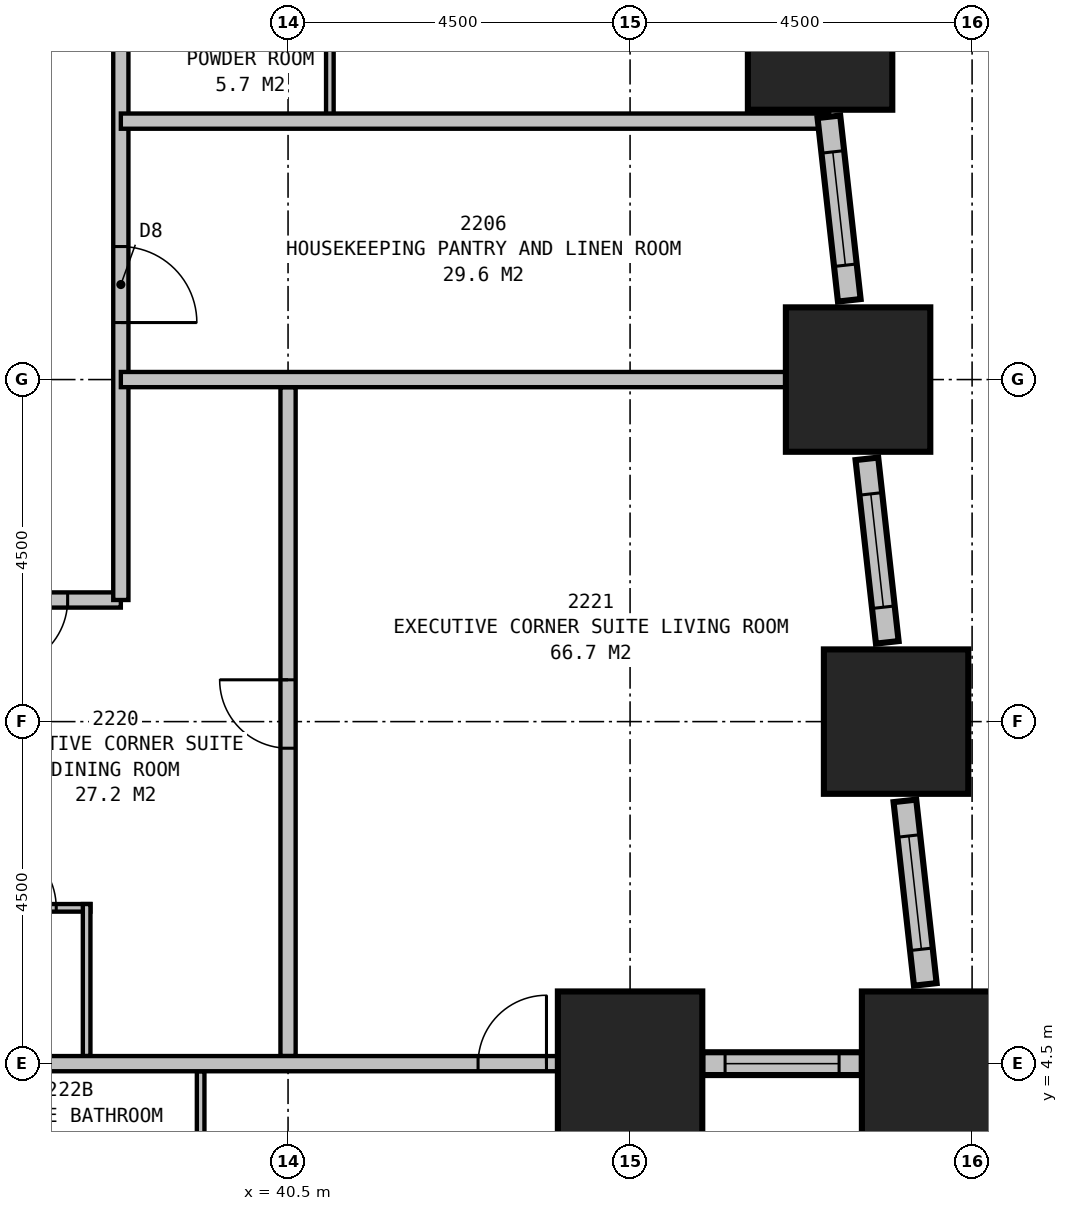
"""IFC4 building model, lengths in metres.
Left out: names, types, materials, properties, quantities, classifications, styles, units other than length and angle.
Written with IfcOpenShell. Run it as: python <this file> out.ifc"""

import sys

from ifc_helpers import new_model, si_unit, direction, frame, frame_2d, origin, origin_2d, place, context, subcontext, project, spatial, rectangle, extrude, element, fill, save


model = new_model("IFC4")
c1 = context("Model", 3, precision=1e-05, world=origin(), true_north=direction((0.0, 1.0)))
c2 = subcontext(c1, "Body", "Model", "MODEL_VIEW")
j1 = project(units=[si_unit("LENGTHUNIT", "METRE"), si_unit("PLANEANGLEUNIT", "RADIAN")], contexts=[c1])
p1 = place(None, origin())
s1 = spatial("IfcSite", under=j1, at=p1, CompositionType="ELEMENT")
p2 = place(p1, origin())
s2 = spatial("IfcBuilding", under=s1, at=p2, CompositionType="ELEMENT")
p3 = place(p2, frame((0.0, 0.0, 89.9)))
s3 = spatial("IfcBuildingStorey", under=s2, at=p3, CompositionType="ELEMENT", Elevation=89.9)
for number, where, z_axis, x_axis in (
    (1, (45.0, 4.5, 0.0), (0.0, 0.0, 1.0), (1.0, 0.0, 0.0)),
    (2, (49.0, 4.5, 0.0), (0.0, 0.0, 1.0), (1.0, 0.0, 0.0)),
    (3, (48.5, 9.0, 0.0), (0.0, 0.0, 1.0), (1.0, 0.0, 0.0)),
    (4, (48.0, 13.5, 0.0), (0.0, 0.0, 1.0), (1.0, 0.0, 0.0)),
    (5, (47.5, 18.0, 0.0), (0.0, 0.0, 1.0), (1.0, 0.0, 0.0)),
):
    element("IfcColumn", number, at=place(p3, frame(where, z_axis=z_axis, x_axis=x_axis)), inside=s3, PredefinedType="COLUMN", context=c2, shape_type="SweptSolid", body=[
        extrude(rectangle(XDim=1.9, YDim=1.9, at=origin_2d()), origin(), (0.0, 0.0, 1.0), 3.5),
    ])
p4 = place(p3, frame((45.95, 4.5, 0.0), z_axis=(0.0, 0.0, 1.0), x_axis=(1.0, 0.0, 0.0)))
e6 = element("IfcWall", 6, at=p4, inside=s3, PredefinedType="STANDARD", context=c2, shape_type="SweptSolid", body=[
    extrude(rectangle(XDim=2.1, YDim=0.3, at=frame_2d((1.05, 0.0))), origin(), (0.0, 0.0, 1.0), 2.15),
])
p5 = place(p4, frame((0.3, 0.0, 0.5)))
e7 = element("IfcOpeningElement", 7, at=p5, cuts=e6, PredefinedType="OPENING", context=c2, shape_type="SweptSolid", body=[
    extrude(rectangle(XDim=1.5, YDim=1.5, at=frame_2d((0.75, 0.75))), frame((0.0, 0.16, 0.0), z_axis=(0.0, -1.0, 0.0), x_axis=(1.0, 0.0, 0.0)), (0.0, 0.0, 1.0), 0.32),
])
p6 = place(p3, frame((48.884, 5.543, 0.0), z_axis=(0.0, 0.0, 1.0), x_axis=(-0.110343286306, 0.993893535127, 0.0)))
e8 = element("IfcWall", 8, at=p6, inside=s3, PredefinedType="STANDARD", context=c2, shape_type="SweptSolid", body=[
    extrude(rectangle(XDim=2.429, YDim=0.3, at=frame_2d((1.215, 0.0))), origin(), (0.0, 0.0, 1.0), 2.15),
])
p7 = place(p6, frame((0.465, 0.0, 0.5)))
e9 = element("IfcOpeningElement", 9, at=p7, cuts=e8, PredefinedType="OPENING", context=c2, shape_type="SweptSolid", body=[
    extrude(rectangle(XDim=1.5, YDim=1.5, at=frame_2d((0.75, 0.75))), frame((0.0, 0.16, 0.0), z_axis=(0.0, -1.0, 0.0), x_axis=(1.0, 0.0, 0.0)), (0.0, 0.0, 1.0), 0.32),
])
p8 = place(p3, frame((48.384, 10.043, 0.0), z_axis=(0.0, 0.0, 1.0), x_axis=(-0.110343286306, 0.993893535127, 0.0)))
e10 = element("IfcWall", 10, at=p8, inside=s3, PredefinedType="STANDARD", context=c2, shape_type="SweptSolid", body=[
    extrude(rectangle(XDim=2.429, YDim=0.3, at=frame_2d((1.215, 0.0))), origin(), (0.0, 0.0, 1.0), 2.15),
])
p9 = place(p8, frame((0.465, 0.0, 0.5)))
e11 = element("IfcOpeningElement", 11, at=p9, cuts=e10, PredefinedType="OPENING", context=c2, shape_type="SweptSolid", body=[
    extrude(rectangle(XDim=1.5, YDim=1.5, at=frame_2d((0.75, 0.75))), frame((0.0, 0.16, 0.0), z_axis=(0.0, -1.0, 0.0), x_axis=(1.0, 0.0, 0.0)), (0.0, 0.0, 1.0), 0.32),
])
p10 = place(p3, frame((47.884, 14.543, 0.0), z_axis=(0.0, 0.0, 1.0), x_axis=(-0.110343286306, 0.993893535127, 0.0)))
e12 = element("IfcWall", 12, at=p10, inside=s3, PredefinedType="STANDARD", context=c2, shape_type="SweptSolid", body=[
    extrude(rectangle(XDim=2.429, YDim=0.3, at=frame_2d((1.215, 0.0))), origin(), (0.0, 0.0, 1.0), 2.15),
])
p11 = place(p10, frame((0.465, 0.0, 0.5)))
e13 = element("IfcOpeningElement", 13, at=p11, cuts=e12, PredefinedType="OPENING", context=c2, shape_type="SweptSolid", body=[
    extrude(rectangle(XDim=1.5, YDim=1.5, at=frame_2d((0.75, 0.75))), frame((0.0, 0.16, 0.0), z_axis=(0.0, -1.0, 0.0), x_axis=(1.0, 0.0, 0.0)), (0.0, 0.0, 1.0), 0.32),
])
p12 = place(p3, frame((11.2, 10.6, 0.0), z_axis=(0.0, 0.0, 1.0), x_axis=(1.0, 0.0, 0.0)))
e14 = element("IfcWall", 14, at=p12, inside=s3, PredefinedType="PARTITIONING", context=c2, shape_type="SweptSolid", body=[
    extrude(rectangle(XDim=27.1, YDim=0.2, at=frame_2d((13.55, 0.0))), origin(), (0.0, 0.0, 1.0), 3.25),
])
p13 = place(p12, frame((5.95, 0.0, 0.0), z_axis=(0.0, 0.0, 1.0), x_axis=(-1.0, 0.0, 0.0)))
e15 = element("IfcOpeningElement", 15, at=p13, cuts=e14, PredefinedType="OPENING", context=c2, shape_type="SweptSolid", body=[
    extrude(rectangle(XDim=0.9, YDim=2.1, at=frame_2d((0.45, 1.05))), frame((0.0, 0.11, 0.0), z_axis=(0.0, -1.0, 0.0), x_axis=(1.0, 0.0, 0.0)), (0.0, 0.0, 1.0), 0.22),
])
p14 = place(p12, frame((13.2, 0.0, 0.0), z_axis=(0.0, 0.0, 1.0), x_axis=(-1.0, 0.0, 0.0)))
e16 = element("IfcOpeningElement", 16, at=p14, cuts=e14, PredefinedType="OPENING", context=c2, shape_type="SweptSolid", body=[
    extrude(rectangle(XDim=1.0, YDim=2.1, at=frame_2d((0.5, 1.05))), frame((0.0, 0.11, 0.0), z_axis=(0.0, -1.0, 0.0), x_axis=(1.0, 0.0, 0.0)), (0.0, 0.0, 1.0), 0.22),
])
p15 = place(p12, frame((20.0, 0.0, 0.0), z_axis=(0.0, 0.0, 1.0), x_axis=(-1.0, 0.0, 0.0)))
e17 = element("IfcOpeningElement", 17, at=p15, cuts=e14, PredefinedType="OPENING", context=c2, shape_type="SweptSolid", body=[
    extrude(rectangle(XDim=0.9, YDim=2.1, at=frame_2d((0.45, 1.05))), frame((0.0, 0.11, 0.0), z_axis=(0.0, -1.0, 0.0), x_axis=(1.0, 0.0, 0.0)), (0.0, 0.0, 1.0), 0.22),
])
p16 = place(p12, frame((1.6, 0.0, 0.0), z_axis=(0.0, 0.0, 1.0), x_axis=(-1.0, 0.0, 0.0)))
e18 = element("IfcOpeningElement", 18, at=p16, cuts=e14, PredefinedType="OPENING", context=c2, shape_type="SweptSolid", body=[
    extrude(rectangle(XDim=0.9, YDim=2.1, at=frame_2d((0.45, 1.05))), frame((0.0, 0.11, 0.0), z_axis=(0.0, -1.0, 0.0), x_axis=(1.0, 0.0, 0.0)), (0.0, 0.0, 1.0), 0.22),
])
p17 = place(p12, frame((26.4, 0.0, 0.0), z_axis=(0.0, 0.0, 1.0), x_axis=(-1.0, 0.0, 0.0)))
e19 = element("IfcOpeningElement", 19, at=p17, cuts=e14, PredefinedType="OPENING", context=c2, shape_type="SweptSolid", body=[
    extrude(rectangle(XDim=0.9, YDim=2.1, at=frame_2d((0.45, 1.05))), frame((0.0, 0.11, 0.0), z_axis=(0.0, -1.0, 0.0), x_axis=(1.0, 0.0, 0.0)), (0.0, 0.0, 1.0), 0.22),
])
p18 = place(p3, frame((38.3, 10.6, 0.0), z_axis=(0.0, 0.0, 1.0), x_axis=(0.0, 1.0, 0.0)))
e20 = element("IfcWall", 20, at=p18, inside=s3, PredefinedType="PARTITIONING", context=c2, shape_type="SweptSolid", body=[
    extrude(rectangle(XDim=19.3, YDim=0.2, at=frame_2d((9.65, 0.0))), origin(), (0.0, 0.0, 1.0), 3.25),
])
p19 = place(p18, frame((4.65, 0.0, 0.0), z_axis=(0.0, 0.0, 1.0), x_axis=(-1.0, 0.0, 0.0)))
e21 = element("IfcOpeningElement", 21, at=p19, cuts=e20, PredefinedType="OPENING", context=c2, shape_type="SweptSolid", body=[
    extrude(rectangle(XDim=1.0, YDim=2.1, at=frame_2d((0.5, 1.05))), frame((0.0, 0.11, 0.0), z_axis=(0.0, -1.0, 0.0), x_axis=(1.0, 0.0, 0.0)), (0.0, 0.0, 1.0), 0.22),
])
p20 = place(p18, frame((9.95, 0.0, 0.0), z_axis=(0.0, 0.0, 1.0), x_axis=(-1.0, 0.0, 0.0)))
e22 = element("IfcOpeningElement", 22, at=p20, cuts=e20, PredefinedType="OPENING", context=c2, shape_type="SweptSolid", body=[
    extrude(rectangle(XDim=0.9, YDim=2.1, at=frame_2d((0.45, 1.05))), frame((0.0, 0.11, 0.0), z_axis=(0.0, -1.0, 0.0), x_axis=(1.0, 0.0, 0.0)), (0.0, 0.0, 1.0), 0.22),
])
p21 = place(p3, frame((38.3, 16.9, 0.0), z_axis=(0.0, 0.0, 1.0), x_axis=(1.0, 0.0, 0.0)))
e23 = element("IfcWall", 23, at=p21, inside=s3, PredefinedType="PARTITIONING", context=c2, shape_type="SweptSolid", body=[
    extrude(rectangle(XDim=9.321, YDim=0.2, at=frame_2d((4.661, 0.0))), origin(), (0.0, 0.0, 1.0), 3.25),
])
p22 = place(p3, frame((41.05, 16.9, 0.0), z_axis=(0.0, 0.0, 1.0), x_axis=(0.0, 1.0, 0.0)))
e24 = element("IfcWall", 24, at=p22, inside=s3, PredefinedType="PLUMBINGWALL", context=c2, shape_type="SweptSolid", body=[
    extrude(rectangle(XDim=2.4, YDim=0.1, at=frame_2d((1.2, 0.0))), origin(), (0.0, 0.0, 1.0), 3.25),
])
p23 = place(p3, frame((38.3, 13.5, 0.0), z_axis=(0.0, 0.0, 1.0), x_axis=(1.0, 0.0, 0.0)))
e25 = element("IfcWall", 25, at=p23, inside=s3, PredefinedType="PARTITIONING", context=c2, shape_type="SweptSolid", body=[
    extrude(rectangle(XDim=9.921, YDim=0.2, at=frame_2d((4.96, 0.0))), origin(), (0.0, 0.0, 1.0), 1.95),
])
p24 = place(p3, frame((35.9, 4.5, 0.0), z_axis=(0.0, 0.0, 1.0), x_axis=(1.0, 0.0, 0.0)))
e26 = element("IfcWall", 26, at=p24, inside=s3, PredefinedType="PARTITIONING", context=c2, shape_type="SweptSolid", body=[
    extrude(rectangle(XDim=9.1, YDim=0.2, at=frame_2d((4.55, 0.0))), origin(), (0.0, 0.0, 1.0), 3.25),
])
p25 = place(p24, frame((7.1, 0.0, 0.0)))
e27 = element("IfcOpeningElement", 27, at=p25, cuts=e26, PredefinedType="OPENING", context=c2, shape_type="SweptSolid", body=[
    extrude(rectangle(XDim=0.9, YDim=2.1, at=frame_2d((0.45, 1.05))), frame((0.0, 0.11, 0.0), z_axis=(0.0, -1.0, 0.0), x_axis=(1.0, 0.0, 0.0)), (0.0, 0.0, 1.0), 0.22),
])
p26 = place(p3, frame((40.5, 4.6, 0.0), z_axis=(0.0, 0.0, 1.0), x_axis=(0.0, 1.0, 0.0)))
e28 = element("IfcWall", 28, at=p26, inside=s3, PredefinedType="PARTITIONING", context=c2, shape_type="SweptSolid", body=[
    extrude(rectangle(XDim=8.8, YDim=0.2, at=frame_2d((4.4, 0.0))), origin(), (0.0, 0.0, 1.0), 2.25),
])
p27 = place(p26, frame((4.05, 0.0, 0.0)))
e29 = element("IfcOpeningElement", 29, at=p27, cuts=e28, PredefinedType="OPENING", context=c2, shape_type="SweptSolid", body=[
    extrude(rectangle(XDim=0.9, YDim=2.1, at=frame_2d((0.45, 1.05))), frame((0.0, 0.11, 0.0), z_axis=(0.0, -1.0, 0.0), x_axis=(1.0, 0.0, 0.0)), (0.0, 0.0, 1.0), 0.22),
])
p28 = place(p3, frame((37.85, 4.6, 0.0), z_axis=(0.0, 0.0, 1.0), x_axis=(0.0, 1.0, 0.0)))
e30 = element("IfcWall", 30, at=p28, inside=s3, PredefinedType="PLUMBINGWALL", context=c2, shape_type="SweptSolid", body=[
    extrude(rectangle(XDim=2.0, YDim=0.1, at=frame_2d((1.0, 0.0))), origin(), (0.0, 0.0, 1.0), 3.25),
])
p29 = place(p3, frame((36.1, 6.55, 0.0), z_axis=(0.0, 0.0, 1.0), x_axis=(1.0, 0.0, 0.0)))
e31 = element("IfcWall", 31, at=p29, inside=s3, PredefinedType="PLUMBINGWALL", context=c2, shape_type="SweptSolid", body=[
    extrude(rectangle(XDim=1.8, YDim=0.1, at=frame_2d((0.9, 0.0))), origin(), (0.0, 0.0, 1.0), 3.25),
])
p30 = place(p29, frame((0.45, 0.0, 0.0)))
e32 = element("IfcOpeningElement", 32, at=p30, cuts=e31, PredefinedType="OPENING", context=c2, shape_type="SweptSolid", body=[
    extrude(rectangle(XDim=0.9, YDim=2.1, at=frame_2d((0.45, 1.05))), frame((0.0, 0.06, 0.0), z_axis=(0.0, -1.0, 0.0), x_axis=(1.0, 0.0, 0.0)), (0.0, 0.0, 1.0), 0.12),
])
p31 = place(p3, frame((39.35, 4.4, 0.0), z_axis=(0.0, 0.0, 1.0), x_axis=(0.0, -1.0, 0.0)))
e33 = element("IfcWall", 33, at=p31, inside=s3, PredefinedType="PLUMBINGWALL", context=c2, shape_type="SweptSolid", body=[
    extrude(rectangle(XDim=2.3, YDim=0.1, at=frame_2d((1.15, 0.0))), origin(), (0.0, 0.0, 1.0), 3.25),
])
p32 = place(p5, origin())
e34 = element("IfcWindow", 34, at=p32, inside=s3, PartitioningType="SINGLE_PANEL", PredefinedType="WINDOW", context=c2, shape_type="SweptSolid", body=[
    extrude(rectangle(XDim=1.5, YDim=1.5, at=frame_2d((0.75, 0.75))), frame((0.0, 0.03, 0.0), z_axis=(0.0, -1.0, 0.0), x_axis=(1.0, 0.0, 0.0)), (0.0, 0.0, 1.0), 0.06),
])
fill(e7, e34)
p33 = place(p7, origin())
e35 = element("IfcWindow", 35, at=p33, inside=s3, PartitioningType="SINGLE_PANEL", PredefinedType="WINDOW", context=c2, shape_type="SweptSolid", body=[
    extrude(rectangle(XDim=1.5, YDim=1.5, at=frame_2d((0.75, 0.75))), frame((0.0, 0.03, 0.0), z_axis=(0.0, -1.0, 0.0), x_axis=(1.0, 0.0, 0.0)), (0.0, 0.0, 1.0), 0.06),
])
fill(e9, e35)
p34 = place(p9, origin())
e36 = element("IfcWindow", 36, at=p34, inside=s3, PartitioningType="SINGLE_PANEL", PredefinedType="WINDOW", context=c2, shape_type="SweptSolid", body=[
    extrude(rectangle(XDim=1.5, YDim=1.5, at=frame_2d((0.75, 0.75))), frame((0.0, 0.03, 0.0), z_axis=(0.0, -1.0, 0.0), x_axis=(1.0, 0.0, 0.0)), (0.0, 0.0, 1.0), 0.06),
])
fill(e11, e36)
p35 = place(p11, origin())
e37 = element("IfcWindow", 37, at=p35, inside=s3, PartitioningType="SINGLE_PANEL", PredefinedType="WINDOW", context=c2, shape_type="SweptSolid", body=[
    extrude(rectangle(XDim=1.5, YDim=1.5, at=frame_2d((0.75, 0.75))), frame((0.0, 0.03, 0.0), z_axis=(0.0, -1.0, 0.0), x_axis=(1.0, 0.0, 0.0)), (0.0, 0.0, 1.0), 0.06),
])
fill(e13, e37)
p36 = place(p17, origin())
e38 = element("IfcDoor", 38, at=p36, inside=s3, OperationType="SINGLE_SWING_RIGHT", PredefinedType="DOOR", context=c2, shape_type="SweptSolid", body=[
    extrude(rectangle(XDim=0.9, YDim=2.1, at=frame_2d((0.45, 1.05))), frame((0.0, 0.025, 0.0), z_axis=(0.0, -1.0, 0.0), x_axis=(1.0, 0.0, 0.0)), (0.0, 0.0, 1.0), 0.05),
])
fill(e19, e38)
p37 = place(p19, origin())
e39 = element("IfcDoor", 39, at=p37, inside=s3, OperationType="SINGLE_SWING_RIGHT", PredefinedType="DOOR", context=c2, shape_type="SweptSolid", body=[
    extrude(rectangle(XDim=1.0, YDim=2.1, at=frame_2d((0.5, 1.05))), frame((0.0, 0.025, 0.0), z_axis=(0.0, -1.0, 0.0), x_axis=(1.0, 0.0, 0.0)), (0.0, 0.0, 1.0), 0.05),
])
fill(e21, e39)
p38 = place(p25, origin())
e40 = element("IfcDoor", 40, at=p38, inside=s3, OperationType="SINGLE_SWING_RIGHT", PredefinedType="DOOR", context=c2, shape_type="SweptSolid", body=[
    extrude(rectangle(XDim=0.9, YDim=2.1, at=frame_2d((0.45, 1.05))), frame((0.0, 0.025, 0.0), z_axis=(0.0, -1.0, 0.0), x_axis=(1.0, 0.0, 0.0)), (0.0, 0.0, 1.0), 0.05),
])
fill(e27, e40)
p39 = place(p27, origin())
e41 = element("IfcDoor", 41, at=p39, inside=s3, OperationType="SINGLE_SWING_RIGHT", PredefinedType="DOOR", context=c2, shape_type="SweptSolid", body=[
    extrude(rectangle(XDim=0.9, YDim=2.1, at=frame_2d((0.45, 1.05))), frame((0.0, 0.025, 0.0), z_axis=(0.0, -1.0, 0.0), x_axis=(1.0, 0.0, 0.0)), (0.0, 0.0, 1.0), 0.05),
])
fill(e29, e41)
p40 = place(p30, origin())
e42 = element("IfcDoor", 42, at=p40, inside=s3, OperationType="SINGLE_SWING_LEFT", PredefinedType="DOOR", context=c2, shape_type="SweptSolid", body=[
    extrude(rectangle(XDim=0.9, YDim=2.1, at=frame_2d((0.45, 1.05))), frame((0.0, 0.025, 0.0), z_axis=(0.0, -1.0, 0.0), x_axis=(1.0, 0.0, 0.0)), (0.0, 0.0, 1.0), 0.05),
])
fill(e32, e42)
save(model, sys.argv[1])
